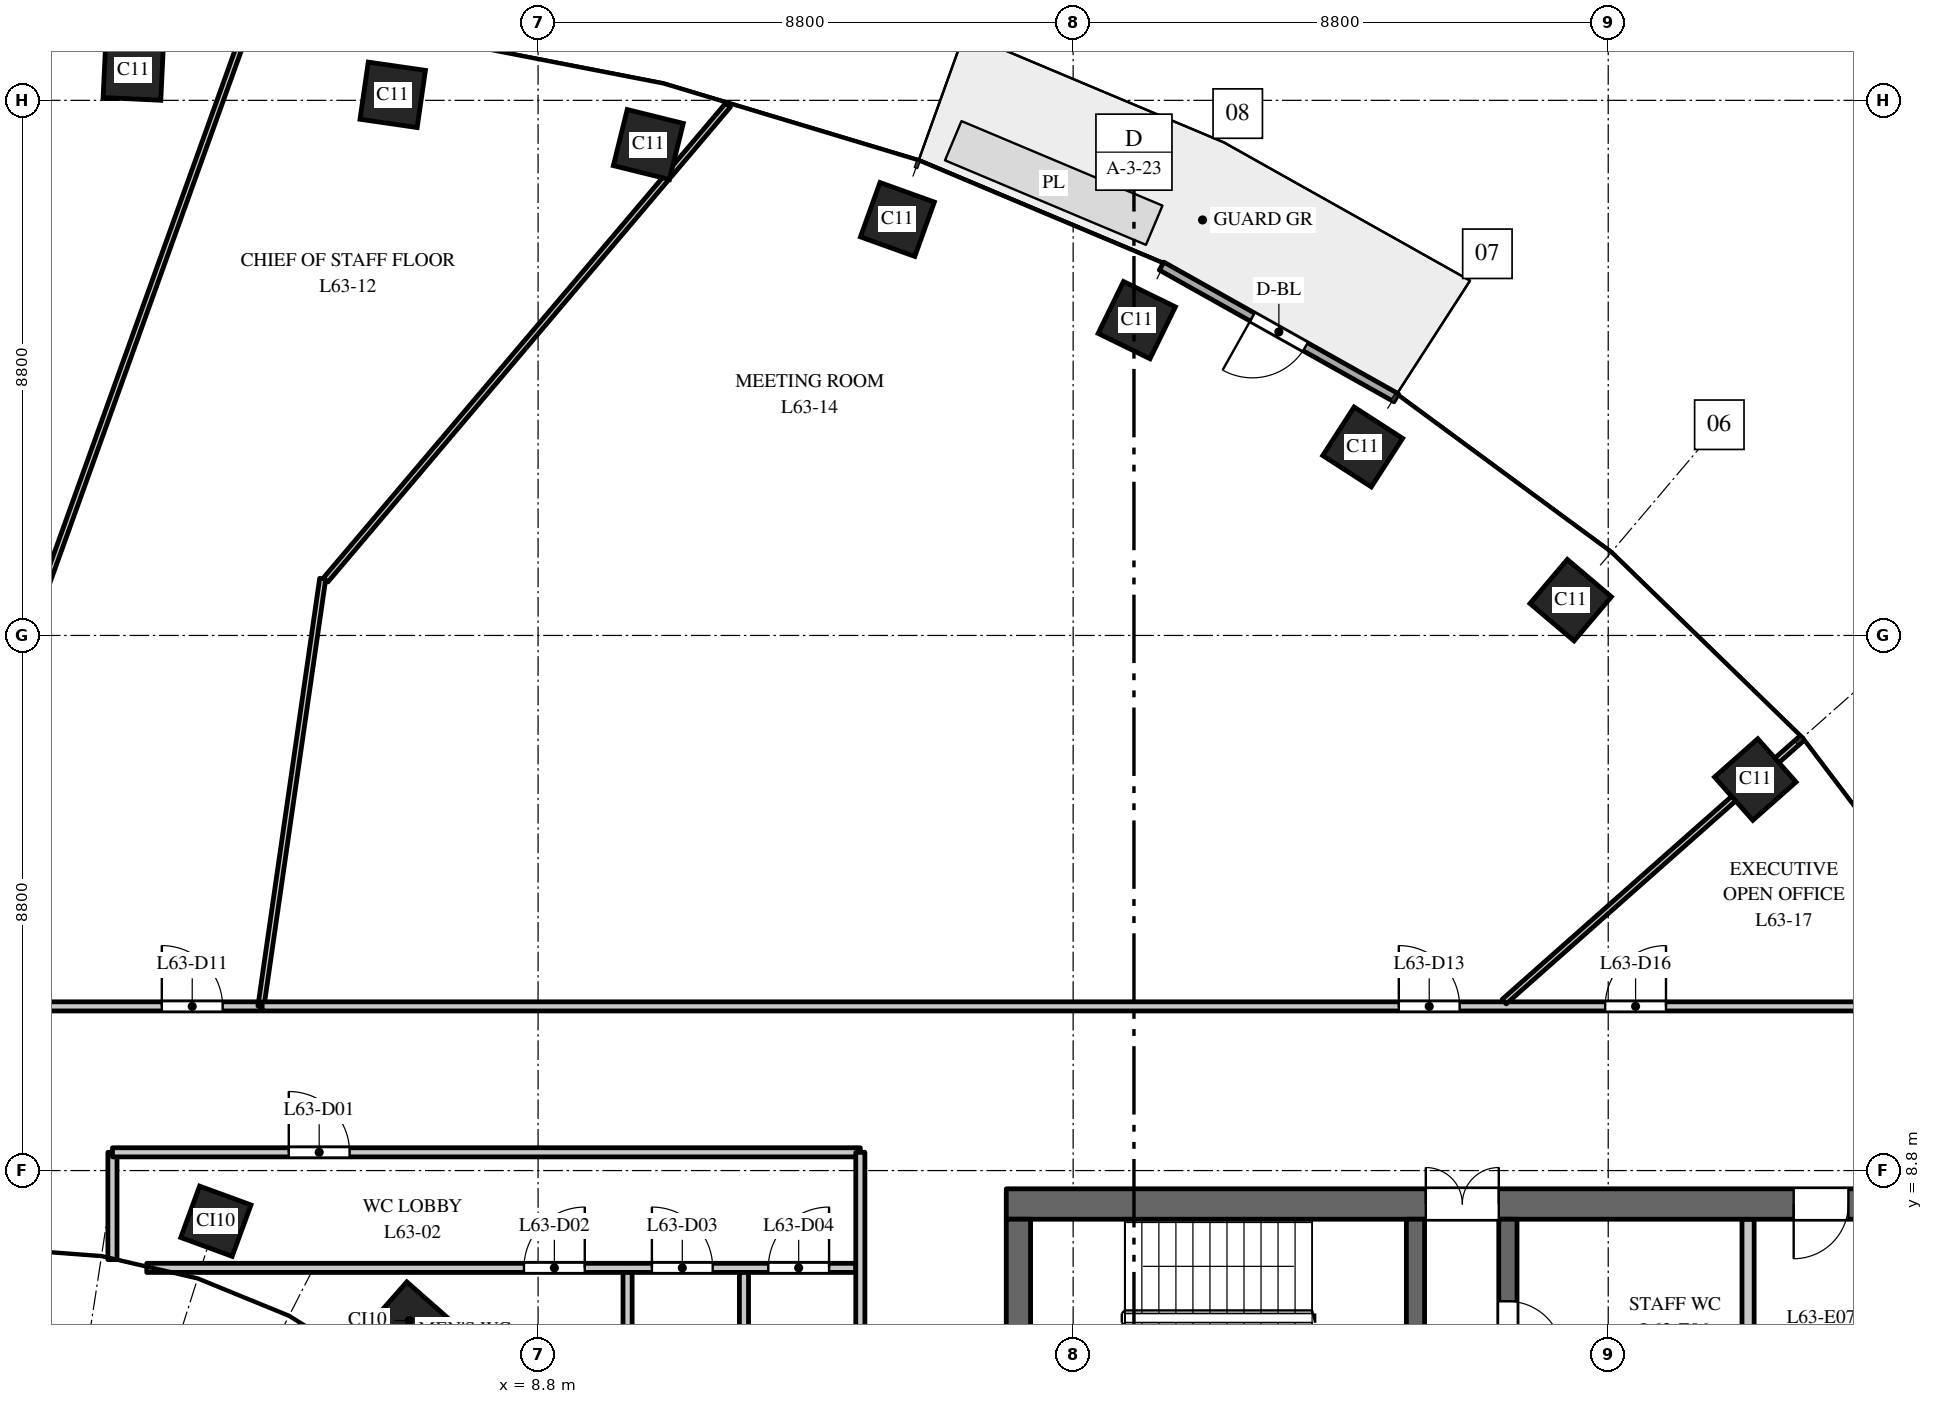
"""IFC4 building model, lengths in metres.
Left out: names, types, materials, properties, quantities, classifications, styles, units other than length and angle.
Written with IfcOpenShell. Run it as: python <this file> out.ifc"""

import sys

from ifc_helpers import new_model, si_unit, direction, frame, frame_2d, origin, origin_2d, place, context, subcontext, project, spatial, rectangle, extrude, element, fill, save


model = new_model("IFC4")
c1 = context("Model", 3, precision=1e-05, world=origin(), true_north=direction((0.0, 1.0)))
c2 = subcontext(c1, "Body", "Model", "MODEL_VIEW")
j1 = project(units=[si_unit("LENGTHUNIT", "METRE"), si_unit("PLANEANGLEUNIT", "RADIAN")], contexts=[c1])
p1 = place(None, origin())
s1 = spatial("IfcSite", under=j1, at=p1, CompositionType="ELEMENT")
p2 = place(p1, origin())
s2 = spatial("IfcBuilding", under=s1, at=p2, CompositionType="ELEMENT")
p3 = place(p2, frame((0.0, 0.0, 295.0)))
s3 = spatial("IfcBuildingStorey", under=s2, at=p3, CompositionType="ELEMENT", Elevation=295.0)
for number, where, z_axis, x_axis in (
    (1, (28.819, 15.23, 0.0), (0.0, 0.0, 1.0), (-0.663, 0.749, 0.0)),
    (2, (25.783, 18.18, 0.0), (0.0, 0.0, 1.0), (-0.763, 0.646, 0.0)),
    (3, (22.362, 20.7, 0.0), (0.0, 0.0, 1.0), (-0.84, 0.542, 0.0)),
    (4, (18.646, 22.785, 0.0), (0.0, 0.0, 1.0), (-0.898, 0.439, 0.0)),
    (5, (14.709, 24.441, 0.0), (0.0, 0.0, 1.0), (-0.941, 0.338, 0.0)),
    (6, (10.613, 25.674, 0.0), (0.0, 0.0, 1.0), (-0.971, 0.24, 0.0)),
    (7, (6.409, 26.491, 0.0), (0.0, 0.0, 1.0), (-0.99, 0.143, 0.0)),
    (8, (2.143, 26.898, 0.0), (0.0, 0.0, 1.0), (-0.999, 0.048, 0.0)),
):
    element("IfcColumn", number, at=place(p3, frame(where, z_axis=z_axis, x_axis=x_axis)), inside=s3, PredefinedType="COLUMN", context=c2, shape_type="SweptSolid", body=[
        extrude(rectangle(XDim=0.95, YDim=0.95, at=origin_2d()), origin(), (0.0, 0.0, 1.0), 4.0),
    ])
for number, where, z_axis, x_axis in (
    (9, (6.682, 6.334, 0.0), (0.0, 0.0, 1.0), (-0.751, 0.66, 0.0)),
    (10, (3.501, 7.967, 0.0), (0.0, 0.0, 1.0), (-0.939, 0.344, 0.0)),
):
    element("IfcColumn", number, at=place(p3, frame(where, z_axis=z_axis, x_axis=x_axis)), inside=s3, PredefinedType="COLUMN", context=c2, shape_type="SweptSolid", body=[
        extrude(rectangle(XDim=0.9, YDim=0.9, at=origin_2d()), origin(), (0.0, 0.0, 1.0), 4.0),
    ])
p4 = place(p3, frame((16.5, 8.25, 0.0), z_axis=(0.0, 0.0, 1.0), x_axis=(1.0, 0.0, 0.0)))
e11 = element("IfcWall", 11, at=p4, inside=s3, PredefinedType="SHEAR", context=c2, shape_type="SweptSolid", body=[
    extrude(rectangle(XDim=15.0, YDim=0.5, at=frame_2d((7.5, 0.0))), origin(), (0.0, 0.0, 1.0), 3.7),
])
p5 = place(p4, frame((6.9, 0.0, 0.0)))
e12 = element("IfcOpeningElement", 12, at=p5, cuts=e11, PredefinedType="OPENING", context=c2, shape_type="SweptSolid", body=[
    extrude(rectangle(XDim=1.2, YDim=2.1, at=frame_2d((0.6, 1.05))), frame((0.0, 0.26, 0.0), z_axis=(0.0, -1.0, 0.0), x_axis=(1.0, 0.0, 0.0)), (0.0, 0.0, 1.0), 0.52),
])
p6 = place(p4, frame((12.95, 0.0, 0.0)))
e13 = element("IfcOpeningElement", 13, at=p6, cuts=e11, PredefinedType="OPENING", context=c2, shape_type="SweptSolid", body=[
    extrude(rectangle(XDim=0.9, YDim=2.1, at=frame_2d((0.45, 1.05))), frame((0.0, 0.26, 0.0), z_axis=(0.0, -1.0, 0.0), x_axis=(1.0, 0.0, 0.0)), (0.0, 0.0, 1.0), 0.52),
])
p7 = place(p3, frame((24.75, -8.0, 0.0), z_axis=(0.0, 0.0, 1.0), x_axis=(0.0, 1.0, 0.0)))
e14 = element("IfcWall", 14, at=p7, inside=s3, PredefinedType="SHEAR", context=c2, shape_type="SweptSolid", body=[
    extrude(rectangle(XDim=16.0, YDim=0.3, at=frame_2d((8.0, 0.0))), origin(), (0.0, 0.0, 1.0), 3.7),
])
p8 = place(p7, frame((4.425, 0.0, 0.0)))
e15 = element("IfcOpeningElement", 15, at=p8, cuts=e14, PredefinedType="OPENING", context=c2, shape_type="SweptSolid", body=[
    extrude(rectangle(XDim=1.1, YDim=2.1, at=frame_2d((0.55, 1.05))), frame((0.0, 0.16, 0.0), z_axis=(0.0, -1.0, 0.0), x_axis=(1.0, 0.0, 0.0)), (0.0, 0.0, 1.0), 0.32),
])
p9 = place(p7, frame((7.45, 0.0, 0.0)))
e16 = element("IfcOpeningElement", 16, at=p9, cuts=e14, PredefinedType="OPENING", context=c2, shape_type="SweptSolid", body=[
    extrude(rectangle(XDim=1.1, YDim=2.1, at=frame_2d((0.55, 1.05))), frame((0.0, 0.16, 0.0), z_axis=(0.0, -1.0, 0.0), x_axis=(1.0, 0.0, 0.0)), (0.0, 0.0, 1.0), 0.32),
])
p10 = place(p7, frame((10.575, 0.0, 0.0)))
e17 = element("IfcOpeningElement", 17, at=p10, cuts=e14, PredefinedType="OPENING", context=c2, shape_type="SweptSolid", body=[
    extrude(rectangle(XDim=0.9, YDim=2.1, at=frame_2d((0.45, 1.05))), frame((0.0, 0.16, 0.0), z_axis=(0.0, -1.0, 0.0), x_axis=(1.0, 0.0, 0.0)), (0.0, 0.0, 1.0), 0.32),
])
p11 = place(p7, frame((13.75, 0.0, 0.0)))
e18 = element("IfcOpeningElement", 18, at=p11, cuts=e14, PredefinedType="OPENING", context=c2, shape_type="SweptSolid", body=[
    extrude(rectangle(XDim=0.9, YDim=2.1, at=frame_2d((0.45, 1.05))), frame((0.0, 0.16, 0.0), z_axis=(0.0, -1.0, 0.0), x_axis=(1.0, 0.0, 0.0)), (0.0, 0.0, 1.0), 0.32),
])
p12 = place(p7, frame((1.975, 0.0, 0.0)))
e19 = element("IfcOpeningElement", 19, at=p12, cuts=e14, PredefinedType="OPENING", context=c2, shape_type="SweptSolid", body=[
    extrude(rectangle(XDim=0.9, YDim=2.1, at=frame_2d((0.45, 1.05))), frame((0.0, 0.16, 0.0), z_axis=(0.0, -1.0, 0.0), x_axis=(1.0, 0.0, 0.0)), (0.0, 0.0, 1.0), 0.32),
])
p13 = place(p7, frame((0.35, 0.0, 0.0)))
e20 = element("IfcOpeningElement", 20, at=p13, cuts=e14, PredefinedType="OPENING", context=c2, shape_type="SweptSolid", body=[
    extrude(rectangle(XDim=0.9, YDim=2.1, at=frame_2d((0.45, 1.05))), frame((0.0, 0.16, 0.0), z_axis=(0.0, -1.0, 0.0), x_axis=(1.0, 0.0, 0.0)), (0.0, 0.0, 1.0), 0.32),
])
p14 = place(p3, frame((16.7, -8.0, 0.0), z_axis=(0.0, 0.0, 1.0), x_axis=(0.0, 1.0, 0.0)))
e21 = element("IfcWall", 21, at=p14, inside=s3, PredefinedType="SHEAR", context=c2, shape_type="SweptSolid", body=[
    extrude(rectangle(XDim=16.0, YDim=0.4, at=frame_2d((8.0, 0.0))), origin(), (0.0, 0.0, 1.0), 3.7),
])
p15 = place(p3, frame((28.7, 4.75, 0.0), z_axis=(0.0, 0.0, 1.0), x_axis=(0.0, 1.0, 0.0)))
e22 = element("IfcWall", 22, at=p15, inside=s3, PredefinedType="PARTITIONING", context=c2, shape_type="SweptSolid", body=[
    extrude(rectangle(XDim=3.25, YDim=0.2, at=frame_2d((1.625, 0.0))), origin(), (0.0, 0.0, 1.0), 3.7),
])
p16 = place(p3, frame((23.23, 2.25, 0.0), z_axis=(0.0, 0.0, 1.0), x_axis=(0.0, 1.0, 0.0)))
e23 = element("IfcWall", 23, at=p16, inside=s3, PredefinedType="SHEAR", context=c2, shape_type="SweptSolid", body=[
    extrude(rectangle(XDim=5.75, YDim=0.3, at=frame_2d((2.875, 0.0))), origin(), (0.0, 0.0, 1.0), 3.7),
])
p17 = place(p16, frame((0.6, 0.0, 0.0)))
e24 = element("IfcOpeningElement", 24, at=p17, cuts=e23, PredefinedType="OPENING", context=c2, shape_type="SweptSolid", body=[
    extrude(rectangle(XDim=1.0, YDim=2.1, at=frame_2d((0.5, 1.05))), frame((0.0, 0.16, 0.0), z_axis=(0.0, -1.0, 0.0), x_axis=(1.0, 0.0, 0.0)), (0.0, 0.0, 1.0), 0.32),
])
p18 = place(p3, frame((22.913, 21.509, 0.0), z_axis=(0.0, 0.0, 1.0), x_axis=(-0.872046572975, 0.489422899509, 0.0)))
e25 = element("IfcWall", 25, at=p18, inside=s3, PredefinedType="STANDARD", context=c2, shape_type="SweptSolid", body=[
    extrude(rectangle(XDim=4.426, YDim=0.15, at=frame_2d((2.213, 0.0))), origin(), (0.0, 0.0, 1.0), 3.7),
])
p19 = place(p18, frame((1.713, 0.0, 0.0)))
e26 = element("IfcOpeningElement", 26, at=p19, cuts=e25, PredefinedType="OPENING", context=c2, shape_type="SweptSolid", body=[
    extrude(rectangle(XDim=1.0, YDim=2.4, at=frame_2d((0.5, 1.2))), frame((0.0, 0.085, 0.0), z_axis=(0.0, -1.0, 0.0), x_axis=(1.0, 0.0, 0.0)), (0.0, 0.0, 1.0), 0.17),
])
p20 = place(p3, frame((-1.758, 11.579, 0.0), z_axis=(0.0, 0.0, 1.0), x_axis=(0.338425059236, 0.940993347097, 0.0)))
e27 = element("IfcWall", 27, at=p20, inside=s3, PredefinedType="PARTITIONING", context=c2, shape_type="SweptSolid", body=[
    extrude(rectangle(XDim=17.15, YDim=0.1, at=frame_2d((8.575, 0.0))), origin(), (0.0, 0.0, 1.0), 2.85),
])
p21 = place(p3, frame((-1.774, 11.5, 0.0), z_axis=(0.0, 0.0, 1.0), x_axis=(1.0, 0.0, 0.0)))
e28 = element("IfcWall", 28, at=p21, inside=s3, PredefinedType="PARTITIONING", context=c2, shape_type="SweptSolid", body=[
    extrude(rectangle(XDim=6.016, YDim=0.15, at=frame_2d((3.008, 0.0))), origin(), (0.0, 0.0, 1.0), 2.85),
])
p22 = place(p21, frame((4.386, 0.0, 0.0)))
e29 = element("IfcOpeningElement", 29, at=p22, cuts=e28, PredefinedType="OPENING", context=c2, shape_type="SweptSolid", body=[
    extrude(rectangle(XDim=1.0, YDim=2.1, at=frame_2d((0.5, 1.05))), frame((0.0, 0.085, 0.0), z_axis=(0.0, -1.0, 0.0), x_axis=(1.0, 0.0, 0.0)), (0.0, 0.0, 1.0), 0.17),
])
p23 = place(p3, frame((1.8, 7.336, 0.0), z_axis=(0.0, 0.0, 1.0), x_axis=(0.0, 1.0, 0.0)))
e30 = element("IfcWall", 30, at=p23, inside=s3, PredefinedType="PARTITIONING", context=c2, shape_type="SweptSolid", body=[
    extrude(rectangle(XDim=1.764, YDim=0.15, at=frame_2d((0.882, 0.0))), origin(), (0.0, 0.0, 1.0), 3.0),
])
p24 = place(p3, frame((1.8, 9.1, 0.0), z_axis=(0.0, 0.0, 1.0), x_axis=(1.0, 0.0, 0.0)))
e31 = element("IfcWall", 31, at=p24, inside=s3, PredefinedType="PARTITIONING", context=c2, shape_type="SweptSolid", body=[
    extrude(rectangle(XDim=12.3, YDim=0.15, at=frame_2d((6.15, 0.0))), origin(), (0.0, 0.0, 1.0), 2.85),
])
p25 = place(p24, frame((2.9, 0.0, 0.0)))
e32 = element("IfcOpeningElement", 32, at=p25, cuts=e31, PredefinedType="OPENING", context=c2, shape_type="SweptSolid", body=[
    extrude(rectangle(XDim=1.0, YDim=2.1, at=frame_2d((0.5, 1.05))), frame((0.0, 0.085, 0.0), z_axis=(0.0, -1.0, 0.0), x_axis=(1.0, 0.0, 0.0)), (0.0, 0.0, 1.0), 0.17),
])
p26 = place(p3, frame((2.364, 7.2, 0.0), z_axis=(0.0, 0.0, 1.0), x_axis=(1.0, 0.0, 0.0)))
e33 = element("IfcWall", 33, at=p26, inside=s3, PredefinedType="PARTITIONING", context=c2, shape_type="SweptSolid", body=[
    extrude(rectangle(XDim=11.661, YDim=0.15, at=frame_2d((5.831, 0.0))), origin(), (0.0, 0.0, 1.0), 2.75),
])
p27 = place(p26, frame((6.204, 0.0, 0.0)))
e34 = element("IfcOpeningElement", 34, at=p27, cuts=e33, PredefinedType="OPENING", context=c2, shape_type="SweptSolid", body=[
    extrude(rectangle(XDim=1.0, YDim=2.1, at=frame_2d((0.5, 1.05))), frame((0.0, 0.085, 0.0), z_axis=(0.0, -1.0, 0.0), x_axis=(1.0, 0.0, 0.0)), (0.0, 0.0, 1.0), 0.17),
])
p28 = place(p26, frame((8.308, 0.0, 0.0)))
e35 = element("IfcOpeningElement", 35, at=p28, cuts=e33, PredefinedType="OPENING", context=c2, shape_type="SweptSolid", body=[
    extrude(rectangle(XDim=1.0, YDim=2.1, at=frame_2d((0.5, 1.05))), frame((0.0, 0.085, 0.0), z_axis=(0.0, -1.0, 0.0), x_axis=(1.0, 0.0, 0.0)), (0.0, 0.0, 1.0), 0.17),
])
p29 = place(p26, frame((10.222, 0.0, 0.0)))
e36 = element("IfcOpeningElement", 36, at=p29, cuts=e33, PredefinedType="OPENING", context=c2, shape_type="SweptSolid", body=[
    extrude(rectangle(XDim=1.0, YDim=2.1, at=frame_2d((0.5, 1.05))), frame((0.0, 0.085, 0.0), z_axis=(0.0, -1.0, 0.0), x_axis=(1.0, 0.0, 0.0)), (0.0, 0.0, 1.0), 0.17),
])
p30 = place(p3, frame((4.242, 11.5, 0.0), z_axis=(0.0, 0.0, 1.0), x_axis=(0.1429940435, 0.98972354904, 0.0)))
e37 = element("IfcWall", 37, at=p30, inside=s3, PredefinedType="PARTITIONING", context=c2, shape_type="SweptSolid", body=[
    extrude(rectangle(XDim=7.106, YDim=0.1, at=frame_2d((3.553, 0.0))), origin(), (0.0, 0.0, 1.0), 3.7),
])
p31 = place(p3, frame((4.262, 11.5, 0.0), z_axis=(0.0, 0.0, 1.0), x_axis=(1.0, 0.0, 0.0)))
e38 = element("IfcWall", 38, at=p31, inside=s3, PredefinedType="PARTITIONING", context=c2, shape_type="SweptSolid", body=[
    extrude(rectangle(XDim=27.238, YDim=0.15, at=frame_2d((13.619, 0.0))), origin(), (0.0, 0.0, 1.0), 2.75),
])
p32 = place(p31, frame((18.694, 0.0, 0.0)))
e39 = element("IfcOpeningElement", 39, at=p32, cuts=e38, PredefinedType="OPENING", context=c2, shape_type="SweptSolid", body=[
    extrude(rectangle(XDim=1.0, YDim=2.1, at=frame_2d((0.5, 1.05))), frame((0.0, 0.085, 0.0), z_axis=(0.0, -1.0, 0.0), x_axis=(1.0, 0.0, 0.0)), (0.0, 0.0, 1.0), 0.17),
])
p33 = place(p31, frame((22.088, 0.0, 0.0)))
e40 = element("IfcOpeningElement", 40, at=p33, cuts=e38, PredefinedType="OPENING", context=c2, shape_type="SweptSolid", body=[
    extrude(rectangle(XDim=1.0, YDim=2.1, at=frame_2d((0.5, 1.05))), frame((0.0, 0.085, 0.0), z_axis=(0.0, -1.0, 0.0), x_axis=(1.0, 0.0, 0.0)), (0.0, 0.0, 1.0), 0.17),
])
p34 = place(p3, frame((5.306, 18.512, 0.0), z_axis=(0.0, 0.0, 1.0), x_axis=(0.646500054355, 0.762913939917, 0.0)))
e41 = element("IfcWall", 41, at=p34, inside=s3, PredefinedType="PARTITIONING", context=c2, shape_type="SweptSolid", body=[
    extrude(rectangle(XDim=10.239, YDim=0.1, at=frame_2d((5.119, 0.0))), origin(), (0.0, 0.0, 1.0), 3.0),
])
for number, where, z_axis, x_axis in (
    (42, (10.272, 4.17, 0.0), (0.0, 0.0, 1.0), (0.0, 1.0, 0.0)),
    (43, (12.186, 4.17, 0.0), (0.0, 0.0, 1.0), (0.0, 1.0, 0.0)),
):
    element("IfcWall", number, at=place(p3, frame(where, z_axis=z_axis, x_axis=x_axis)), inside=s3, PredefinedType="PARTITIONING", context=c2, shape_type="SweptSolid", body=[
        extrude(rectangle(XDim=2.955, YDim=0.15, at=frame_2d((1.478, 0.0))), origin(), (0.0, 0.0, 1.0), 2.75),
    ])
p35 = place(p3, frame((14.1, 4.095, 0.0), z_axis=(0.0, 0.0, 1.0), x_axis=(0.0, 1.0, 0.0)))
e44 = element("IfcWall", 44, at=p35, inside=s3, PredefinedType="PARTITIONING", context=c2, shape_type="SweptSolid", body=[
    extrude(rectangle(XDim=5.005, YDim=0.15, at=frame_2d((2.502, 0.0))), origin(), (0.0, 0.0, 1.0), 2.75),
])
p36 = place(p3, frame((24.689, 11.578, 0.0), z_axis=(0.0, 0.0, 1.0), x_axis=(0.748988695283, 0.662582775461, 0.0)))
e45 = element("IfcWall", 45, at=p36, inside=s3, PredefinedType="PARTITIONING", context=c2, shape_type="SweptSolid", body=[
    extrude(rectangle(XDim=6.516, YDim=0.1, at=frame_2d((3.258, 0.0))), origin(), (0.0, 0.0, 1.0), 2.75),
])
p37 = place(p5, origin())
e46 = element("IfcDoor", 46, at=p37, inside=s3, OperationType="DOUBLE_DOOR_DOUBLE_SWING", PredefinedType="DOOR", context=c2, shape_type="SweptSolid", body=[
    extrude(rectangle(XDim=1.2, YDim=2.1, at=frame_2d((0.6, 1.05))), frame((0.0, 0.025, 0.0), z_axis=(0.0, -1.0, 0.0), x_axis=(1.0, 0.0, 0.0)), (0.0, 0.0, 1.0), 0.05),
])
fill(e12, e46)
p38 = place(p11, origin())
e47 = element("IfcDoor", 47, at=p38, inside=s3, OperationType="SINGLE_SWING_LEFT", PredefinedType="DOOR", context=c2, shape_type="SweptSolid", body=[
    extrude(rectangle(XDim=0.9, YDim=2.1, at=frame_2d((0.45, 1.05))), frame((0.0, 0.025, 0.0), z_axis=(0.0, -1.0, 0.0), x_axis=(1.0, 0.0, 0.0)), (0.0, 0.0, 1.0), 0.05),
])
fill(e18, e47)
p39 = place(p6, origin())
e48 = element("IfcDoor", 48, at=p39, inside=s3, OperationType="SINGLE_SWING_LEFT", PredefinedType="DOOR", context=c2, shape_type="SweptSolid", body=[
    extrude(rectangle(XDim=0.9, YDim=2.1, at=frame_2d((0.45, 1.05))), frame((0.0, 0.025, 0.0), z_axis=(0.0, -1.0, 0.0), x_axis=(1.0, 0.0, 0.0)), (0.0, 0.0, 1.0), 0.05),
])
fill(e13, e48)
p40 = place(p19, origin())
e49 = element("IfcDoor", 49, at=p40, inside=s3, OperationType="SINGLE_SWING_RIGHT", PredefinedType="DOOR", context=c2, shape_type="SweptSolid", body=[
    extrude(rectangle(XDim=1.0, YDim=2.4, at=frame_2d((0.5, 1.2))), frame((0.0, 0.025, 0.0), z_axis=(0.0, -1.0, 0.0), x_axis=(1.0, 0.0, 0.0)), (0.0, 0.0, 1.0), 0.05),
])
fill(e26, e49)
p41 = place(p25, origin())
e50 = element("IfcDoor", 50, at=p41, inside=s3, OperationType="SINGLE_SWING_LEFT", PredefinedType="DOOR", context=c2, shape_type="SweptSolid", body=[
    extrude(rectangle(XDim=1.0, YDim=2.1, at=frame_2d((0.5, 1.05))), frame((0.0, 0.025, 0.0), z_axis=(0.0, -1.0, 0.0), x_axis=(1.0, 0.0, 0.0)), (0.0, 0.0, 1.0), 0.05),
])
fill(e32, e50)
p42 = place(p27, origin())
e51 = element("IfcDoor", 51, at=p42, inside=s3, OperationType="SINGLE_SWING_RIGHT", PredefinedType="DOOR", context=c2, shape_type="SweptSolid", body=[
    extrude(rectangle(XDim=1.0, YDim=2.1, at=frame_2d((0.5, 1.05))), frame((0.0, 0.025, 0.0), z_axis=(0.0, -1.0, 0.0), x_axis=(1.0, 0.0, 0.0)), (0.0, 0.0, 1.0), 0.05),
])
fill(e34, e51)
p43 = place(p28, origin())
e52 = element("IfcDoor", 52, at=p43, inside=s3, OperationType="SINGLE_SWING_LEFT", PredefinedType="DOOR", context=c2, shape_type="SweptSolid", body=[
    extrude(rectangle(XDim=1.0, YDim=2.1, at=frame_2d((0.5, 1.05))), frame((0.0, 0.025, 0.0), z_axis=(0.0, -1.0, 0.0), x_axis=(1.0, 0.0, 0.0)), (0.0, 0.0, 1.0), 0.05),
])
fill(e35, e52)
p44 = place(p29, origin())
e53 = element("IfcDoor", 53, at=p44, inside=s3, OperationType="SINGLE_SWING_RIGHT", PredefinedType="DOOR", context=c2, shape_type="SweptSolid", body=[
    extrude(rectangle(XDim=1.0, YDim=2.1, at=frame_2d((0.5, 1.05))), frame((0.0, 0.025, 0.0), z_axis=(0.0, -1.0, 0.0), x_axis=(1.0, 0.0, 0.0)), (0.0, 0.0, 1.0), 0.05),
])
fill(e36, e53)
p45 = place(p22, origin())
e54 = element("IfcDoor", 54, at=p45, inside=s3, OperationType="SINGLE_SWING_LEFT", PredefinedType="DOOR", context=c2, shape_type="SweptSolid", body=[
    extrude(rectangle(XDim=1.0, YDim=2.1, at=frame_2d((0.5, 1.05))), frame((0.0, 0.025, 0.0), z_axis=(0.0, -1.0, 0.0), x_axis=(1.0, 0.0, 0.0)), (0.0, 0.0, 1.0), 0.05),
])
fill(e29, e54)
p46 = place(p32, origin())
e55 = element("IfcDoor", 55, at=p46, inside=s3, OperationType="SINGLE_SWING_LEFT", PredefinedType="DOOR", context=c2, shape_type="SweptSolid", body=[
    extrude(rectangle(XDim=1.0, YDim=2.1, at=frame_2d((0.5, 1.05))), frame((0.0, 0.025, 0.0), z_axis=(0.0, -1.0, 0.0), x_axis=(1.0, 0.0, 0.0)), (0.0, 0.0, 1.0), 0.05),
])
fill(e39, e55)
p47 = place(p33, origin())
e56 = element("IfcDoor", 56, at=p47, inside=s3, OperationType="SINGLE_SWING_RIGHT", PredefinedType="DOOR", context=c2, shape_type="SweptSolid", body=[
    extrude(rectangle(XDim=1.0, YDim=2.1, at=frame_2d((0.5, 1.05))), frame((0.0, 0.025, 0.0), z_axis=(0.0, -1.0, 0.0), x_axis=(1.0, 0.0, 0.0)), (0.0, 0.0, 1.0), 0.05),
])
fill(e40, e56)
save(model, sys.argv[1])
